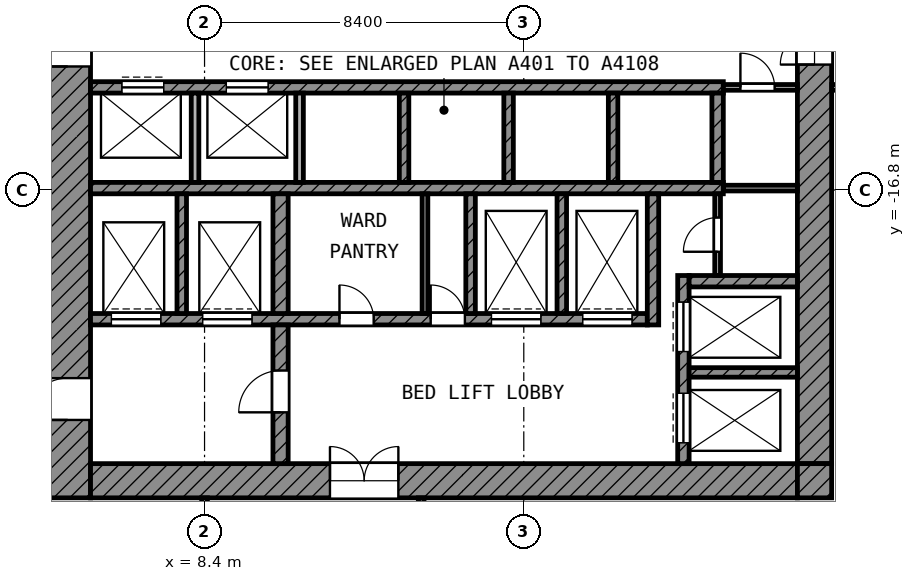
"""IFC4 building model, lengths in metres.
Left out: names, types, materials, properties, quantities, classifications, styles, units other than length and angle.
Written with IfcOpenShell. Run it as: python <this file> out.ifc"""

import sys

from ifc_helpers import new_model, si_unit, direction, frame, frame_2d, origin, place, context, subcontext, project, spatial, rectangle, extrude, element, fill, save


model = new_model("IFC4")
c1 = context("Model", 3, precision=1e-05, world=origin(), true_north=direction((0.0, 1.0)))
c2 = subcontext(c1, "Body", "Model", "MODEL_VIEW")
j1 = project(units=[si_unit("LENGTHUNIT", "METRE"), si_unit("PLANEANGLEUNIT", "RADIAN")], contexts=[c1])
p1 = place(None, origin())
s1 = spatial("IfcSite", under=j1, at=p1, CompositionType="ELEMENT")
p2 = place(p1, origin())
s2 = spatial("IfcBuilding", under=s1, at=p2, CompositionType="ELEMENT")
p3 = place(p2, frame((0.0, 0.0, 179.4)))
s3 = spatial("IfcBuildingStorey", under=s2, at=p3, CompositionType="ELEMENT", Elevation=179.4)
p4 = place(p3, frame((4.8, -24.9, 0.0), z_axis=(0.0, 0.0, 1.0), x_axis=(0.0, 1.0, 0.0)))
e1 = element("IfcWall", 1, at=p4, inside=s3, PredefinedType="SHEAR", context=c2, shape_type="SweptSolid", body=[
    extrude(rectangle(XDim=19.5, YDim=1.2, at=frame_2d((9.75, 0.0))), origin(), (0.0, 0.0, 1.0), 3.6),
])
p5 = place(p4, frame((11.35, 0.0, 0.0)))
e2 = element("IfcOpeningElement", 2, at=p5, cuts=e1, PredefinedType="OPENING", context=c2, shape_type="SweptSolid", body=[
    extrude(rectangle(XDim=1.1, YDim=2.1, at=frame_2d((0.55, 1.05))), frame((0.0, 0.61, 0.0), z_axis=(0.0, -1.0, 0.0), x_axis=(1.0, 0.0, 0.0)), (0.0, 0.0, 1.0), 1.22),
])
p6 = place(p4, frame((2.05, 0.0, 0.0)))
e3 = element("IfcOpeningElement", 3, at=p6, cuts=e1, PredefinedType="OPENING", context=c2, shape_type="SweptSolid", body=[
    extrude(rectangle(XDim=1.1, YDim=2.1, at=frame_2d((0.55, 1.05))), frame((0.0, 0.61, 0.0), z_axis=(0.0, -1.0, 0.0), x_axis=(1.0, 0.0, 0.0)), (0.0, 0.0, 1.0), 1.22),
])
p7 = place(p3, frame((24.45, -24.0, 0.0), z_axis=(0.0, 0.0, 1.0), x_axis=(0.0, 1.0, 0.0)))
e4 = element("IfcWall", 4, at=p7, inside=s3, PredefinedType="SHEAR", context=c2, shape_type="SweptSolid", body=[
    extrude(rectangle(XDim=18.6, YDim=0.9, at=frame_2d((9.3, 0.0))), origin(), (0.0, 0.0, 1.0), 3.6),
])
p8 = place(p7, frame((10.5, 0.0, 0.0)))
e5 = element("IfcOpeningElement", 5, at=p8, cuts=e4, PredefinedType="OPENING", context=c2, shape_type="SweptSolid", body=[
    extrude(rectangle(XDim=1.8, YDim=2.1, at=frame_2d((0.9, 1.05))), frame((0.0, 0.46, 0.0), z_axis=(0.0, -1.0, 0.0), x_axis=(1.0, 0.0, 0.0)), (0.0, 0.0, 1.0), 0.92),
])
p9 = place(p3, frame((5.4, -24.45, 0.0), z_axis=(0.0, 0.0, 1.0), x_axis=(1.0, 0.0, 0.0)))
e6 = element("IfcWall", 6, at=p9, inside=s3, PredefinedType="SHEAR", context=c2, shape_type="SweptSolid", body=[
    extrude(rectangle(XDim=18.6, YDim=0.9, at=frame_2d((9.3, 0.0))), origin(), (0.0, 0.0, 1.0), 3.6),
])
p10 = place(p9, frame((6.3, 0.0, 0.0)))
e7 = element("IfcOpeningElement", 7, at=p10, cuts=e6, PredefinedType="OPENING", context=c2, shape_type="SweptSolid", body=[
    extrude(rectangle(XDim=1.8, YDim=2.1, at=frame_2d((0.9, 1.05))), frame((0.0, 0.46, 0.0), z_axis=(0.0, -1.0, 0.0), x_axis=(1.0, 0.0, 0.0)), (0.0, 0.0, 1.0), 0.92),
])
p11 = place(p3, frame((24.45, -24.9, 0.0), z_axis=(0.0, 0.0, 1.0), x_axis=(0.0, 1.0, 0.0)))
e8 = element("IfcWall", 8, at=p11, inside=s3, PredefinedType="SHEAR", context=c2, shape_type="SweptSolid", body=[
    extrude(rectangle(XDim=0.9, YDim=0.9, at=frame_2d((0.45, 0.0))), origin(), (0.0, 0.0, 1.0), 3.6),
])
p12 = place(p3, frame((5.4, -14.1, 0.0), z_axis=(0.0, 0.0, 1.0), x_axis=(1.0, 0.0, 0.0)))
e9 = element("IfcWall", 9, at=p12, inside=s3, PredefinedType="SHEAR", context=c2, shape_type="SweptSolid", body=[
    extrude(rectangle(XDim=16.65, YDim=0.3, at=frame_2d((8.325, 0.0))), origin(), (0.0, 0.0, 1.0), 3.6),
])
p13 = place(p12, frame((0.825, 0.0, 0.0)))
e10 = element("IfcOpeningElement", 10, at=p13, cuts=e9, PredefinedType="OPENING", context=c2, shape_type="SweptSolid", body=[
    extrude(rectangle(XDim=1.1, YDim=2.1, at=frame_2d((0.55, 1.05))), frame((0.0, 0.16, 0.0), z_axis=(0.0, -1.0, 0.0), x_axis=(1.0, 0.0, 0.0)), (0.0, 0.0, 1.0), 0.32),
])
p14 = place(p12, frame((3.575, 0.0, 0.0)))
e11 = element("IfcOpeningElement", 11, at=p14, cuts=e9, PredefinedType="OPENING", context=c2, shape_type="SweptSolid", body=[
    extrude(rectangle(XDim=1.1, YDim=2.1, at=frame_2d((0.55, 1.05))), frame((0.0, 0.16, 0.0), z_axis=(0.0, -1.0, 0.0), x_axis=(1.0, 0.0, 0.0)), (0.0, 0.0, 1.0), 0.32),
])
p15 = place(p3, frame((5.4, -16.75, 0.0), z_axis=(0.0, 0.0, 1.0), x_axis=(1.0, 0.0, 0.0)))
e12 = element("IfcWall", 12, at=p15, inside=s3, PredefinedType="SHEAR", context=c2, shape_type="SweptSolid", body=[
    extrude(rectangle(XDim=16.65, YDim=0.3, at=frame_2d((8.325, 0.0))), origin(), (0.0, 0.0, 1.0), 3.6),
])
p16 = place(p3, frame((5.4, -20.2, 0.0), z_axis=(0.0, 0.0, 1.0), x_axis=(1.0, 0.0, 0.0)))
e13 = element("IfcWall", 13, at=p16, inside=s3, PredefinedType="SHEAR", context=c2, shape_type="SweptSolid", body=[
    extrude(rectangle(XDim=14.65, YDim=0.3, at=frame_2d((7.325, 0.0))), origin(), (0.0, 0.0, 1.0), 3.6),
])
p17 = place(p16, frame((10.55, 0.0, 0.0)))
e14 = element("IfcOpeningElement", 14, at=p17, cuts=e13, PredefinedType="OPENING", context=c2, shape_type="SweptSolid", body=[
    extrude(rectangle(XDim=1.3, YDim=2.1, at=frame_2d((0.65, 1.05))), frame((0.0, 0.16, 0.0), z_axis=(0.0, -1.0, 0.0), x_axis=(1.0, 0.0, 0.0)), (0.0, 0.0, 1.0), 0.32),
])
p18 = place(p16, frame((12.95, 0.0, 0.0)))
e15 = element("IfcOpeningElement", 15, at=p18, cuts=e13, PredefinedType="OPENING", context=c2, shape_type="SweptSolid", body=[
    extrude(rectangle(XDim=1.3, YDim=2.1, at=frame_2d((0.65, 1.05))), frame((0.0, 0.16, 0.0), z_axis=(0.0, -1.0, 0.0), x_axis=(1.0, 0.0, 0.0)), (0.0, 0.0, 1.0), 0.32),
])
p19 = place(p16, frame((0.55, 0.0, 0.0)))
e16 = element("IfcOpeningElement", 16, at=p19, cuts=e13, PredefinedType="OPENING", context=c2, shape_type="SweptSolid", body=[
    extrude(rectangle(XDim=1.3, YDim=2.1, at=frame_2d((0.65, 1.05))), frame((0.0, 0.16, 0.0), z_axis=(0.0, -1.0, 0.0), x_axis=(1.0, 0.0, 0.0)), (0.0, 0.0, 1.0), 0.32),
])
p20 = place(p16, frame((2.95, 0.0, 0.0)))
e17 = element("IfcOpeningElement", 17, at=p20, cuts=e13, PredefinedType="OPENING", context=c2, shape_type="SweptSolid", body=[
    extrude(rectangle(XDim=1.3, YDim=2.1, at=frame_2d((0.65, 1.05))), frame((0.0, 0.16, 0.0), z_axis=(0.0, -1.0, 0.0), x_axis=(1.0, 0.0, 0.0)), (0.0, 0.0, 1.0), 0.32),
])
p21 = place(p16, frame((6.55, 0.0, 0.0)))
e18 = element("IfcOpeningElement", 18, at=p21, cuts=e13, PredefinedType="OPENING", context=c2, shape_type="SweptSolid", body=[
    extrude(rectangle(XDim=0.9, YDim=2.1, at=frame_2d((0.45, 1.05))), frame((0.0, 0.16, 0.0), z_axis=(0.0, -1.0, 0.0), x_axis=(1.0, 0.0, 0.0)), (0.0, 0.0, 1.0), 0.32),
])
p22 = place(p16, frame((8.95, 0.0, 0.0)))
e19 = element("IfcOpeningElement", 19, at=p22, cuts=e13, PredefinedType="OPENING", context=c2, shape_type="SweptSolid", body=[
    extrude(rectangle(XDim=0.9, YDim=2.1, at=frame_2d((0.45, 1.05))), frame((0.0, 0.16, 0.0), z_axis=(0.0, -1.0, 0.0), x_axis=(1.0, 0.0, 0.0)), (0.0, 0.0, 1.0), 0.32),
])
p23 = place(p3, frame((10.4, -24.0, 0.0), z_axis=(0.0, 0.0, 1.0), x_axis=(0.0, 1.0, 0.0)))
e20 = element("IfcWall", 20, at=p23, inside=s3, PredefinedType="SHEAR", context=c2, shape_type="SweptSolid", body=[
    extrude(rectangle(XDim=3.65, YDim=0.4, at=frame_2d((1.825, 0.0))), origin(), (0.0, 0.0, 1.0), 3.6),
])
p24 = place(p23, frame((1.35, 0.0, 0.0)))
e21 = element("IfcOpeningElement", 21, at=p24, cuts=e20, PredefinedType="OPENING", context=c2, shape_type="SweptSolid", body=[
    extrude(rectangle(XDim=1.1, YDim=2.1, at=frame_2d((0.55, 1.05))), frame((0.0, 0.21, 0.0), z_axis=(0.0, -1.0, 0.0), x_axis=(1.0, 0.0, 0.0)), (0.0, 0.0, 1.0), 0.42),
])
p25 = place(p3, frame((10.4, -20.05, 0.0), z_axis=(0.0, 0.0, 1.0), x_axis=(0.0, 1.0, 0.0)))
e22 = element("IfcWall", 22, at=p25, inside=s3, PredefinedType="SHEAR", context=c2, shape_type="SweptSolid", body=[
    extrude(rectangle(XDim=3.15, YDim=0.4, at=frame_2d((1.575, 0.0))), origin(), (0.0, 0.0, 1.0), 3.6),
])
p26 = place(p3, frame((20.2, -20.35, 0.0), z_axis=(0.0, 0.0, 1.0), x_axis=(0.0, 1.0, 0.0)))
e23 = element("IfcWall", 23, at=p26, inside=s3, PredefinedType="SHEAR", context=c2, shape_type="SweptSolid", body=[
    extrude(rectangle(XDim=3.45, YDim=0.3, at=frame_2d((1.725, 0.0))), origin(), (0.0, 0.0, 1.0), 3.6),
])
p27 = place(p3, frame((21.9, -16.6, 0.0), z_axis=(0.0, 0.0, 1.0), x_axis=(0.0, 1.0, 0.0)))
e24 = element("IfcWall", 24, at=p27, inside=s3, PredefinedType="SHEAR", context=c2, shape_type="SweptSolid", body=[
    extrude(rectangle(XDim=2.35, YDim=0.3, at=frame_2d((1.175, 0.0))), origin(), (0.0, 0.0, 1.0), 3.6),
])
p28 = place(p3, frame((21.15, -19.2, 0.0), z_axis=(0.0, 0.0, 1.0), x_axis=(1.0, 0.0, 0.0)))
e25 = element("IfcWall", 25, at=p28, inside=s3, PredefinedType="SHEAR", context=c2, shape_type="SweptSolid", body=[
    extrude(rectangle(XDim=2.85, YDim=0.3, at=frame_2d((1.425, 0.0))), origin(), (0.0, 0.0, 1.0), 3.6),
])
p29 = place(p3, frame((21.0, -24.0, 0.0), z_axis=(0.0, 0.0, 1.0), x_axis=(0.0, 1.0, 0.0)))
e26 = element("IfcWall", 26, at=p29, inside=s3, PredefinedType="SHEAR", context=c2, shape_type="SweptSolid", body=[
    extrude(rectangle(XDim=4.95, YDim=0.3, at=frame_2d((2.475, 0.0))), origin(), (0.0, 0.0, 1.0), 3.6),
])
p30 = place(p29, frame((2.95, 0.0, 0.0)))
e27 = element("IfcOpeningElement", 27, at=p30, cuts=e26, PredefinedType="OPENING", context=c2, shape_type="SweptSolid", body=[
    extrude(rectangle(XDim=1.3, YDim=2.1, at=frame_2d((0.65, 1.05))), frame((0.0, 0.16, 0.0), z_axis=(0.0, -1.0, 0.0), x_axis=(1.0, 0.0, 0.0)), (0.0, 0.0, 1.0), 0.32),
])
p31 = place(p29, frame((0.55, 0.0, 0.0)))
e28 = element("IfcOpeningElement", 28, at=p31, cuts=e26, PredefinedType="OPENING", context=c2, shape_type="SweptSolid", body=[
    extrude(rectangle(XDim=1.3, YDim=2.1, at=frame_2d((0.65, 1.05))), frame((0.0, 0.16, 0.0), z_axis=(0.0, -1.0, 0.0), x_axis=(1.0, 0.0, 0.0)), (0.0, 0.0, 1.0), 0.32),
])
p32 = place(p3, frame((21.15, -21.6, 0.0), z_axis=(0.0, 0.0, 1.0), x_axis=(1.0, 0.0, 0.0)))
e29 = element("IfcWall", 29, at=p32, inside=s3, PredefinedType="SHEAR", context=c2, shape_type="SweptSolid", body=[
    extrude(rectangle(XDim=2.85, YDim=0.25, at=frame_2d((1.425, 0.0))), origin(), (0.0, 0.0, 1.0), 3.6),
])
for number, where, z_axis, x_axis in (
    (30, (7.8, -20.05, 0.0), (0.0, 0.0, 1.0), (0.0, 1.0, 0.0)),
    (31, (15.4, -20.05, 0.0), (0.0, 0.0, 1.0), (0.0, 1.0, 0.0)),
    (32, (17.8, -20.05, 0.0), (0.0, 0.0, 1.0), (0.0, 1.0, 0.0)),
):
    element("IfcWall", number, at=place(p3, frame(where, z_axis=z_axis, x_axis=x_axis)), inside=s3, PredefinedType="SHEAR", context=c2, shape_type="SweptSolid", body=[
        extrude(rectangle(XDim=3.15, YDim=0.25, at=frame_2d((1.575, 0.0))), origin(), (0.0, 0.0, 1.0), 3.6),
    ])
for number, where, z_axis, x_axis in (
    (33, (8.15, -16.6, 0.0), (0.0, 0.0, 1.0), (0.0, 1.0, 0.0)),
    (34, (10.9, -16.6, 0.0), (0.0, 0.0, 1.0), (0.0, 1.0, 0.0)),
):
    element("IfcWall", number, at=place(p3, frame(where, z_axis=z_axis, x_axis=x_axis)), inside=s3, PredefinedType="PARTITIONING", context=c2, shape_type="SweptSolid", body=[
        extrude(rectangle(XDim=2.35, YDim=0.2, at=frame_2d((1.175, 0.0))), origin(), (0.0, 0.0, 1.0), 3.6),
    ])
for number, where, z_axis, x_axis in (
    (35, (13.65, -16.6, 0.0), (0.0, 0.0, 1.0), (0.0, 1.0, 0.0)),
    (36, (16.4, -16.6, 0.0), (0.0, 0.0, 1.0), (0.0, 1.0, 0.0)),
    (37, (19.15, -16.6, 0.0), (0.0, 0.0, 1.0), (0.0, 1.0, 0.0)),
):
    element("IfcWall", number, at=place(p3, frame(where, z_axis=z_axis, x_axis=x_axis)), inside=s3, PredefinedType="SHEAR", context=c2, shape_type="SweptSolid", body=[
        extrude(rectangle(XDim=2.35, YDim=0.25, at=frame_2d((1.175, 0.0))), origin(), (0.0, 0.0, 1.0), 3.6),
    ])
p33 = place(p3, frame((21.9, -19.05, 0.0), z_axis=(0.0, 0.0, 1.0), x_axis=(0.0, 1.0, 0.0)))
e38 = element("IfcWall", 38, at=p33, inside=s3, PredefinedType="PARTITIONING", context=c2, shape_type="SweptSolid", body=[
    extrude(rectangle(XDim=2.15, YDim=0.15, at=frame_2d((1.075, 0.0))), origin(), (0.0, 0.0, 1.0), 3.6),
])
p34 = place(p33, frame((0.625, 0.0, 0.0)))
e39 = element("IfcOpeningElement", 39, at=p34, cuts=e38, PredefinedType="OPENING", context=c2, shape_type="SweptSolid", body=[
    extrude(rectangle(XDim=0.9, YDim=2.1, at=frame_2d((0.45, 1.05))), frame((0.0, 0.085, 0.0), z_axis=(0.0, -1.0, 0.0), x_axis=(1.0, 0.0, 0.0)), (0.0, 0.0, 1.0), 0.17),
])
p35 = place(p3, frame((22.05, -16.75, 0.0), z_axis=(0.0, 0.0, 1.0), x_axis=(1.0, 0.0, 0.0)))
e40 = element("IfcWall", 40, at=p35, inside=s3, PredefinedType="PARTITIONING", context=c2, shape_type="SweptSolid", body=[
    extrude(rectangle(XDim=1.95, YDim=0.15, at=frame_2d((0.975, 0.0))), origin(), (0.0, 0.0, 1.0), 3.6),
])
p36 = place(p3, frame((22.05, -14.1, 0.0), z_axis=(0.0, 0.0, 1.0), x_axis=(1.0, 0.0, 0.0)))
e41 = element("IfcWall", 41, at=p36, inside=s3, PredefinedType="PARTITIONING", context=c2, shape_type="SweptSolid", body=[
    extrude(rectangle(XDim=1.95, YDim=0.15, at=frame_2d((0.975, 0.0))), origin(), (0.0, 0.0, 1.0), 3.6),
])
p37 = place(p36, frame((0.45, 0.0, 0.0)))
e42 = element("IfcOpeningElement", 42, at=p37, cuts=e41, PredefinedType="OPENING", context=c2, shape_type="SweptSolid", body=[
    extrude(rectangle(XDim=0.9, YDim=2.1, at=frame_2d((0.45, 1.05))), frame((0.0, 0.085, 0.0), z_axis=(0.0, -1.0, 0.0), x_axis=(1.0, 0.0, 0.0)), (0.0, 0.0, 1.0), 0.17),
])
p38 = place(p3, frame((14.2, -20.05, 0.0), z_axis=(0.0, 0.0, 1.0), x_axis=(0.0, 1.0, 0.0)))
e43 = element("IfcWall", 43, at=p38, inside=s3, PredefinedType="PARTITIONING", context=c2, shape_type="SweptSolid", body=[
    extrude(rectangle(XDim=3.15, YDim=0.15, at=frame_2d((1.575, 0.0))), origin(), (0.0, 0.0, 1.0), 3.6),
])
p39 = place(p3, frame((24.9, -14.1, 0.0), z_axis=(0.0, 0.0, 1.0), x_axis=(1.0, 0.0, 0.0)))
e44 = element("IfcWall", 44, at=p39, inside=s3, PredefinedType="PARTITIONING", context=c2, shape_type="SweptSolid", body=[
    extrude(rectangle(XDim=4.425, YDim=0.15, at=frame_2d((2.212, 0.0))), origin(), (0.0, 0.0, 1.0), 3.6),
])
p40 = place(p39, frame((1.65, 0.0, 0.0)))
e45 = element("IfcOpeningElement", 45, at=p40, cuts=e44, PredefinedType="OPENING", context=c2, shape_type="SweptSolid", body=[
    extrude(rectangle(XDim=1.5, YDim=2.1, at=frame_2d((0.75, 1.05))), frame((0.0, 0.085, 0.0), z_axis=(0.0, -1.0, 0.0), x_axis=(1.0, 0.0, 0.0)), (0.0, 0.0, 1.0), 0.17),
])
p41 = place(p3, frame((8.4, -31.857, 0.0), z_axis=(0.0, 0.0, 1.0), x_axis=(0.0, 1.0, 0.0)))
e46 = element("IfcWall", 46, at=p41, inside=s3, PredefinedType="PARTITIONING", context=c2, shape_type="SweptSolid", body=[
    extrude(rectangle(XDim=6.957, YDim=0.15, at=frame_2d((3.479, 0.0))), origin(), (0.0, 0.0, 1.0), 3.6),
])
p42 = place(p3, frame((14.1, -29.325, 0.0), z_axis=(0.0, 0.0, 1.0), x_axis=(0.0, 1.0, 0.0)))
e47 = element("IfcWall", 47, at=p42, inside=s3, PredefinedType="PARTITIONING", context=c2, shape_type="SweptSolid", body=[
    extrude(rectangle(XDim=4.425, YDim=0.15, at=frame_2d((2.212, 0.0))), origin(), (0.0, 0.0, 1.0), 3.6),
])
p43 = place(p13, origin())
e48 = element("IfcDoor", 48, at=p43, inside=s3, OperationType="DOUBLE_DOOR_SLIDING", PredefinedType="DOOR", context=c2, shape_type="SweptSolid", body=[
    extrude(rectangle(XDim=1.1, YDim=2.1, at=frame_2d((0.55, 1.05))), frame((0.0, 0.025, 0.0), z_axis=(0.0, -1.0, 0.0), x_axis=(1.0, 0.0, 0.0)), (0.0, 0.0, 1.0), 0.05),
])
fill(e10, e48)
p44 = place(p14, origin())
e49 = element("IfcDoor", 49, at=p44, inside=s3, OperationType="DOUBLE_DOOR_SLIDING", PredefinedType="DOOR", context=c2, shape_type="SweptSolid", body=[
    extrude(rectangle(XDim=1.1, YDim=2.1, at=frame_2d((0.55, 1.05))), frame((0.0, 0.025, 0.0), z_axis=(0.0, -1.0, 0.0), x_axis=(1.0, 0.0, 0.0)), (0.0, 0.0, 1.0), 0.05),
])
fill(e11, e49)
p45 = place(p30, origin())
e50 = element("IfcDoor", 50, at=p45, inside=s3, OperationType="DOUBLE_DOOR_SLIDING", PredefinedType="DOOR", context=c2, shape_type="SweptSolid", body=[
    extrude(rectangle(XDim=1.3, YDim=2.1, at=frame_2d((0.65, 1.05))), frame((0.0, 0.025, 0.0), z_axis=(0.0, -1.0, 0.0), x_axis=(1.0, 0.0, 0.0)), (0.0, 0.0, 1.0), 0.05),
])
fill(e27, e50)
p46 = place(p31, origin())
e51 = element("IfcDoor", 51, at=p46, inside=s3, OperationType="DOUBLE_DOOR_SLIDING", PredefinedType="DOOR", context=c2, shape_type="SweptSolid", body=[
    extrude(rectangle(XDim=1.3, YDim=2.1, at=frame_2d((0.65, 1.05))), frame((0.0, 0.025, 0.0), z_axis=(0.0, -1.0, 0.0), x_axis=(1.0, 0.0, 0.0)), (0.0, 0.0, 1.0), 0.05),
])
fill(e28, e51)
p47 = place(p17, origin())
e52 = element("IfcDoor", 52, at=p47, inside=s3, OperationType="DOUBLE_DOOR_SLIDING", PredefinedType="DOOR", context=c2, shape_type="SweptSolid", body=[
    extrude(rectangle(XDim=1.3, YDim=2.1, at=frame_2d((0.65, 1.05))), frame((0.0, 0.025, 0.0), z_axis=(0.0, -1.0, 0.0), x_axis=(1.0, 0.0, 0.0)), (0.0, 0.0, 1.0), 0.05),
])
fill(e14, e52)
p48 = place(p18, origin())
e53 = element("IfcDoor", 53, at=p48, inside=s3, OperationType="DOUBLE_DOOR_SLIDING", PredefinedType="DOOR", context=c2, shape_type="SweptSolid", body=[
    extrude(rectangle(XDim=1.3, YDim=2.1, at=frame_2d((0.65, 1.05))), frame((0.0, 0.025, 0.0), z_axis=(0.0, -1.0, 0.0), x_axis=(1.0, 0.0, 0.0)), (0.0, 0.0, 1.0), 0.05),
])
fill(e15, e53)
p49 = place(p19, origin())
e54 = element("IfcDoor", 54, at=p49, inside=s3, OperationType="DOUBLE_DOOR_SLIDING", PredefinedType="DOOR", context=c2, shape_type="SweptSolid", body=[
    extrude(rectangle(XDim=1.3, YDim=2.1, at=frame_2d((0.65, 1.05))), frame((0.0, 0.025, 0.0), z_axis=(0.0, -1.0, 0.0), x_axis=(1.0, 0.0, 0.0)), (0.0, 0.0, 1.0), 0.05),
])
fill(e16, e54)
p50 = place(p20, origin())
e55 = element("IfcDoor", 55, at=p50, inside=s3, OperationType="DOUBLE_DOOR_SLIDING", PredefinedType="DOOR", context=c2, shape_type="SweptSolid", body=[
    extrude(rectangle(XDim=1.3, YDim=2.1, at=frame_2d((0.65, 1.05))), frame((0.0, 0.025, 0.0), z_axis=(0.0, -1.0, 0.0), x_axis=(1.0, 0.0, 0.0)), (0.0, 0.0, 1.0), 0.05),
])
fill(e17, e55)
p51 = place(p5, origin())
e56 = element("IfcDoor", 56, at=p51, inside=s3, OperationType="SINGLE_SWING_LEFT", PredefinedType="DOOR", context=c2, shape_type="SweptSolid", body=[
    extrude(rectangle(XDim=1.1, YDim=2.1, at=frame_2d((0.55, 1.05))), frame((0.0, 0.025, 0.0), z_axis=(0.0, -1.0, 0.0), x_axis=(1.0, 0.0, 0.0)), (0.0, 0.0, 1.0), 0.05),
])
fill(e2, e56)
p52 = place(p6, origin())
e57 = element("IfcDoor", 57, at=p52, inside=s3, OperationType="SINGLE_SWING_LEFT", PredefinedType="DOOR", context=c2, shape_type="SweptSolid", body=[
    extrude(rectangle(XDim=1.1, YDim=2.1, at=frame_2d((0.55, 1.05))), frame((0.0, 0.025, 0.0), z_axis=(0.0, -1.0, 0.0), x_axis=(1.0, 0.0, 0.0)), (0.0, 0.0, 1.0), 0.05),
])
fill(e3, e57)
p53 = place(p24, origin())
e58 = element("IfcDoor", 58, at=p53, inside=s3, OperationType="SINGLE_SWING_LEFT", PredefinedType="DOOR", context=c2, shape_type="SweptSolid", body=[
    extrude(rectangle(XDim=1.1, YDim=2.1, at=frame_2d((0.55, 1.05))), frame((0.0, 0.025, 0.0), z_axis=(0.0, -1.0, 0.0), x_axis=(1.0, 0.0, 0.0)), (0.0, 0.0, 1.0), 0.05),
])
fill(e21, e58)
p54 = place(p8, origin())
e59 = element("IfcDoor", 59, at=p54, inside=s3, OperationType="DOUBLE_DOOR_SINGLE_SWING", PredefinedType="DOOR", context=c2, shape_type="SweptSolid", body=[
    extrude(rectangle(XDim=1.8, YDim=2.1, at=frame_2d((0.9, 1.05))), frame((0.0, 0.025, 0.0), z_axis=(0.0, -1.0, 0.0), x_axis=(1.0, 0.0, 0.0)), (0.0, 0.0, 1.0), 0.05),
])
fill(e5, e59)
p55 = place(p10, origin())
e60 = element("IfcDoor", 60, at=p55, inside=s3, OperationType="DOUBLE_DOOR_SINGLE_SWING", PredefinedType="DOOR", context=c2, shape_type="SweptSolid", body=[
    extrude(rectangle(XDim=1.8, YDim=2.1, at=frame_2d((0.9, 1.05))), frame((0.0, 0.025, 0.0), z_axis=(0.0, -1.0, 0.0), x_axis=(1.0, 0.0, 0.0)), (0.0, 0.0, 1.0), 0.05),
])
fill(e7, e60)
p56 = place(p37, origin())
e61 = element("IfcDoor", 61, at=p56, inside=s3, OperationType="SINGLE_SWING_LEFT", PredefinedType="DOOR", context=c2, shape_type="SweptSolid", body=[
    extrude(rectangle(XDim=0.9, YDim=2.1, at=frame_2d((0.45, 1.05))), frame((0.0, 0.025, 0.0), z_axis=(0.0, -1.0, 0.0), x_axis=(1.0, 0.0, 0.0)), (0.0, 0.0, 1.0), 0.05),
])
fill(e42, e61)
p57 = place(p34, origin())
e62 = element("IfcDoor", 62, at=p57, inside=s3, OperationType="SINGLE_SWING_LEFT", PredefinedType="DOOR", context=c2, shape_type="SweptSolid", body=[
    extrude(rectangle(XDim=0.9, YDim=2.1, at=frame_2d((0.45, 1.05))), frame((0.0, 0.025, 0.0), z_axis=(0.0, -1.0, 0.0), x_axis=(1.0, 0.0, 0.0)), (0.0, 0.0, 1.0), 0.05),
])
fill(e39, e62)
p58 = place(p21, origin())
e63 = element("IfcDoor", 63, at=p58, inside=s3, OperationType="SINGLE_SWING_LEFT", PredefinedType="DOOR", context=c2, shape_type="SweptSolid", body=[
    extrude(rectangle(XDim=0.9, YDim=2.1, at=frame_2d((0.45, 1.05))), frame((0.0, 0.025, 0.0), z_axis=(0.0, -1.0, 0.0), x_axis=(1.0, 0.0, 0.0)), (0.0, 0.0, 1.0), 0.05),
])
fill(e18, e63)
p59 = place(p22, origin())
e64 = element("IfcDoor", 64, at=p59, inside=s3, OperationType="SINGLE_SWING_LEFT", PredefinedType="DOOR", context=c2, shape_type="SweptSolid", body=[
    extrude(rectangle(XDim=0.9, YDim=2.1, at=frame_2d((0.45, 1.05))), frame((0.0, 0.025, 0.0), z_axis=(0.0, -1.0, 0.0), x_axis=(1.0, 0.0, 0.0)), (0.0, 0.0, 1.0), 0.05),
])
fill(e19, e64)
save(model, sys.argv[1])
